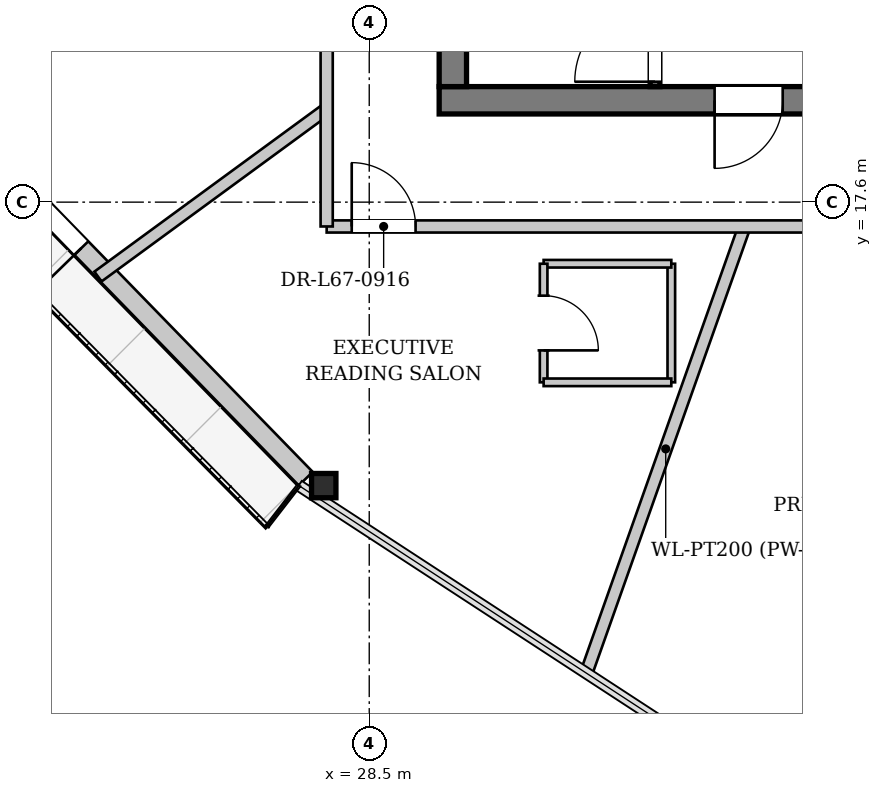
"""IFC4 building model, lengths in metres.
Left out: names, types, materials, properties, quantities, classifications, styles, units other than length and angle.
Written with IfcOpenShell. Run it as: python <this file> out.ifc"""

import sys

from ifc_helpers import new_model, si_unit, direction, frame, frame_2d, origin, origin_2d, place, context, subcontext, project, spatial, rectangle, i_section, extrude, source, transform, mapped, element, fill, save


model = new_model("IFC4")
c1 = context("Model", 3, precision=1e-05, world=origin(), true_north=direction((0.0, 1.0)))
c2 = subcontext(c1, "Body", "Model", "MODEL_VIEW")
j1 = project(units=[si_unit("LENGTHUNIT", "METRE"), si_unit("PLANEANGLEUNIT", "RADIAN")], contexts=[c1])
p1 = place(None, origin())
s1 = spatial("IfcSite", under=j1, at=p1, CompositionType="ELEMENT")
p2 = place(p1, origin())
s2 = spatial("IfcBuilding", under=s1, at=p2, CompositionType="ELEMENT")
p3 = place(p2, frame((0.0, 0.0, 252.5)))
s3 = spatial("IfcBuildingStorey", under=s2, at=p3, CompositionType="ELEMENT", Elevation=252.5)
m1 = source(origin(), c2, "Body", "SweptSolid", [
    extrude(i_section(OverallWidth=0.401, OverallDepth=0.399, WebThickness=0.022, FlangeThickness=0.034, at=origin_2d()), origin(), (0.0, 0.0, 1.0), 3.532),
])
p4 = place(p3, frame((27.341, 12.94, 0.0), z_axis=(0.232405350285, -0.001036906679, 0.972618464756), x_axis=(0.004461585576, 0.999990047078, 0.0)))
e1 = element("IfcColumn", 1, at=p4, inside=s3, PredefinedType="COLUMN", context=c2, shape_type="MappedRepresentation", body=[
    mapped(m1, transform((0.0, 0.0, 0.0), x_axis=(1.0, 0.0, 0.0), y_axis=(0.0, 1.0, 0.0), z_axis=(0.0, 0.0, 1.0), scale=1.0)),
])
p5 = place(p3, frame((27.456, 13.052, 0.0), z_axis=(0.0, 0.0, 1.0), x_axis=(-0.697464355139, 0.71661947595, 0.0)))
e2 = element("IfcWall", 2, at=p5, inside=s3, PredefinedType="SOLIDWALL", context=c2, shape_type="SweptSolid", body=[
    extrude(rectangle(XDim=17.474, YDim=0.32, at=frame_2d((8.737, 0.0))), origin(), (0.0, 0.0, 1.0), 2.872),
])
p6 = place(p5, frame((5.292, 0.0, 0.0)))
e3 = element("IfcOpeningElement", 3, at=p6, cuts=e2, PredefinedType="OPENING", context=c2, shape_type="SweptSolid", body=[
    extrude(rectangle(XDim=1.5, YDim=2.3, at=frame_2d((0.75, 1.15))), frame((0.0, 0.17, 0.0), z_axis=(0.0, -1.0, 0.0), x_axis=(1.0, 0.0, 0.0)), (0.0, 0.0, 1.0), 0.34),
])
p7 = place(p5, frame((11.631, 0.0, 0.402)))
e4 = element("IfcOpeningElement", 4, at=p7, cuts=e2, PredefinedType="OPENING", context=c2, shape_type="SweptSolid", body=[
    extrude(rectangle(XDim=2.6, YDim=2.35, at=frame_2d((1.3, 1.175))), frame((0.0, 0.17, 0.0), z_axis=(0.0, -1.0, 0.0), x_axis=(1.0, 0.0, 0.0)), (0.0, 0.0, 1.0), 0.34),
])
p8 = place(p3, frame((46.35, 19.275, 0.0), z_axis=(0.0, 0.0, 1.0), x_axis=(-1.0, 0.0, 0.0)))
e5 = element("IfcWall", 5, at=p8, inside=s3, PredefinedType="SHEAR", context=c2, shape_type="SweptSolid", body=[
    extrude(rectangle(XDim=16.7, YDim=0.45, at=frame_2d((8.35, 0.0))), origin(), (0.0, 0.0, 1.0), 3.38),
])
p9 = place(p8, frame((4.55, 0.0, 0.0)))
e6 = element("IfcOpeningElement", 6, at=p9, cuts=e5, PredefinedType="OPENING", context=c2, shape_type="SweptSolid", body=[
    extrude(rectangle(XDim=1.12, YDim=2.25, at=frame_2d((0.56, 1.125))), frame((0.0, 0.235, 0.0), z_axis=(0.0, -1.0, 0.0), x_axis=(1.0, 0.0, 0.0)), (0.0, 0.0, 1.0), 0.47),
])
p10 = place(p8, frame((11.05, 0.0, 0.0)))
e7 = element("IfcOpeningElement", 7, at=p10, cuts=e5, PredefinedType="OPENING", context=c2, shape_type="SweptSolid", body=[
    extrude(rectangle(XDim=1.12, YDim=2.25, at=frame_2d((0.56, 1.125))), frame((0.0, 0.235, 0.0), z_axis=(0.0, -1.0, 0.0), x_axis=(1.0, 0.0, 0.0)), (0.0, 0.0, 1.0), 0.47),
])
p11 = place(p3, frame((29.875, 19.5, 0.0), z_axis=(0.0, 0.0, 1.0), x_axis=(0.0, 1.0, 0.0)))
e8 = element("IfcWall", 8, at=p11, inside=s3, PredefinedType="SHEAR", context=c2, shape_type="SweptSolid", body=[
    extrude(rectangle(XDim=14.2, YDim=0.45, at=frame_2d((7.1, 0.0))), origin(), (0.0, 0.0, 1.0), 3.38),
])
p12 = place(p11, frame((7.42, 0.0, 0.0)))
e9 = element("IfcOpeningElement", 9, at=p12, cuts=e8, PredefinedType="OPENING", context=c2, shape_type="SweptSolid", body=[
    extrude(rectangle(XDim=1.6, YDim=2.2, at=frame_2d((0.8, 1.1))), frame((0.0, 0.235, 0.0), z_axis=(0.0, -1.0, 0.0), x_axis=(1.0, 0.0, 0.0)), (0.0, 0.0, 1.0), 0.47),
])
p13 = place(p3, frame((33.2, 19.5, 0.0), z_axis=(0.0, 0.0, 1.0), x_axis=(0.0, 1.0, 0.0)))
e10 = element("IfcWall", 10, at=p13, inside=s3, PredefinedType="PARTITIONING", context=c2, shape_type="SweptSolid", body=[
    extrude(rectangle(XDim=7.46, YDim=0.16, at=frame_2d((3.73, 0.0))), origin(), (0.0, 0.0, 1.0), 3.38),
])
p14 = place(p13, frame((0.08, 0.0, 0.0)))
e11 = element("IfcOpeningElement", 11, at=p14, cuts=e10, PredefinedType="OPENING", context=c2, shape_type="SweptSolid", body=[
    extrude(rectangle(XDim=1.32, YDim=2.2, at=frame_2d((0.66, 1.1))), frame((0.0, 0.09, 0.0), z_axis=(0.0, -1.0, 0.0), x_axis=(1.0, 0.0, 0.0)), (0.0, 0.0, 1.0), 0.18),
])
p15 = place(p3, frame((34.671, 17.2, 0.0), z_axis=(0.0, 0.0, 1.0), x_axis=(-0.333820355847, -0.942636711582, 0.0)))
e12 = element("IfcWall", 12, at=p15, inside=s3, PredefinedType="PARTITIONING", context=c2, shape_type="SweptSolid", body=[
    extrude(rectangle(XDim=7.761, YDim=0.2, at=frame_2d((3.881, 0.0))), origin(), (0.0, 0.0, 1.0), 3.38),
])
p16 = place(p3, frame((27.8, 19.131, 0.0), z_axis=(0.0, 0.0, 1.0), x_axis=(-0.80679773716, -0.590827734042, 0.0)))
e13 = element("IfcWall", 13, at=p16, inside=s3, PredefinedType="PARTITIONING", context=c2, shape_type="SweptSolid", body=[
    extrude(rectangle(XDim=4.662, YDim=0.2, at=frame_2d((2.331, 0.0))), origin(), (0.0, 0.0, 1.0), 3.38),
])
p17 = place(p3, frame((33.468, 14.637, 0.0), z_axis=(0.0, 0.0, 1.0), x_axis=(0.0, 1.0, 0.0)))
e14 = element("IfcWall", 14, at=p17, inside=s3, PredefinedType="PARTITIONING", context=c2, shape_type="SweptSolid", body=[
    extrude(rectangle(XDim=1.95, YDim=0.125, at=frame_2d((0.975, 0.0))), origin(), (0.0, 0.0, 1.0), 3.38),
])
p18 = place(p3, frame((33.468, 16.587, 0.0), z_axis=(0.0, 0.0, 1.0), x_axis=(-1.0, 0.0, 0.0)))
e15 = element("IfcWall", 15, at=p18, inside=s3, PredefinedType="PARTITIONING", context=c2, shape_type="SweptSolid", body=[
    extrude(rectangle(XDim=2.1, YDim=0.125, at=frame_2d((1.05, 0.0))), origin(), (0.0, 0.0, 1.0), 3.38),
])
p19 = place(p3, frame((31.368, 16.587, 0.0), z_axis=(0.0, 0.0, 1.0), x_axis=(0.0, -1.0, 0.0)))
e16 = element("IfcWall", 16, at=p19, inside=s3, PredefinedType="PARTITIONING", context=c2, shape_type="SweptSolid", body=[
    extrude(rectangle(XDim=1.95, YDim=0.125, at=frame_2d((0.975, 0.0))), origin(), (0.0, 0.0, 1.0), 3.38),
])
p20 = place(p19, frame((0.525, 0.0, 0.0)))
e17 = element("IfcOpeningElement", 17, at=p20, cuts=e16, PredefinedType="OPENING", context=c2, shape_type="SweptSolid", body=[
    extrude(rectangle(XDim=0.9, YDim=2.1, at=frame_2d((0.45, 1.05))), frame((0.0, 0.073, 0.0), z_axis=(0.0, -1.0, 0.0), x_axis=(1.0, 0.0, 0.0)), (0.0, 0.0, 1.0), 0.145),
])
p21 = place(p3, frame((31.368, 14.637, 0.0), z_axis=(0.0, 0.0, 1.0), x_axis=(1.0, 0.0, 0.0)))
e18 = element("IfcWall", 18, at=p21, inside=s3, PredefinedType="PARTITIONING", context=c2, shape_type="SweptSolid", body=[
    extrude(rectangle(XDim=2.1, YDim=0.125, at=frame_2d((1.05, 0.0))), origin(), (0.0, 0.0, 1.0), 3.38),
])
p22 = place(p3, frame((27.8, 17.2, 0.0), z_axis=(0.0, 0.0, 1.0), x_axis=(1.0, 0.0, 0.0)))
e19 = element("IfcWall", 19, at=p22, inside=s3, PredefinedType="PARTITIONING", context=c2, shape_type="SweptSolid", body=[
    extrude(rectangle(XDim=20.4, YDim=0.2, at=frame_2d((10.2, 0.0))), origin(), (0.0, 0.0, 1.0), 3.38),
])
p23 = place(p22, frame((9.356, 0.0, 0.0)))
e20 = element("IfcOpeningElement", 20, at=p23, cuts=e19, PredefinedType="OPENING", context=c2, shape_type="SweptSolid", body=[
    extrude(rectangle(XDim=1.05, YDim=2.2, at=frame_2d((0.525, 1.1))), frame((0.0, 0.11, 0.0), z_axis=(0.0, -1.0, 0.0), x_axis=(1.0, 0.0, 0.0)), (0.0, 0.0, 1.0), 0.22),
])
p24 = place(p22, frame((17.51, 0.0, 0.0)))
e21 = element("IfcOpeningElement", 21, at=p24, cuts=e19, PredefinedType="OPENING", context=c2, shape_type="SweptSolid", body=[
    extrude(rectangle(XDim=1.05, YDim=2.2, at=frame_2d((0.525, 1.1))), frame((0.0, 0.11, 0.0), z_axis=(0.0, -1.0, 0.0), x_axis=(1.0, 0.0, 0.0)), (0.0, 0.0, 1.0), 0.22),
])
p25 = place(p22, frame((0.412, 0.0, 0.0)))
e22 = element("IfcOpeningElement", 22, at=p25, cuts=e19, PredefinedType="OPENING", context=c2, shape_type="SweptSolid", body=[
    extrude(rectangle(XDim=1.05, YDim=2.2, at=frame_2d((0.525, 1.1))), frame((0.0, 0.11, 0.0), z_axis=(0.0, -1.0, 0.0), x_axis=(1.0, 0.0, 0.0)), (0.0, 0.0, 1.0), 0.22),
])
p26 = place(p3, frame((27.8, 17.2, 0.0), z_axis=(0.0, 0.0, 1.0), x_axis=(0.0, 1.0, 0.0)))
e23 = element("IfcWall", 23, at=p26, inside=s3, PredefinedType="PARTITIONING", context=c2, shape_type="SweptSolid", body=[
    extrude(rectangle(XDim=18.8, YDim=0.2, at=frame_2d((9.4, 0.0))), origin(), (0.0, 0.0, 1.0), 3.38),
])
p27 = place(p26, frame((14.526, 0.0, 0.0)))
e24 = element("IfcOpeningElement", 24, at=p27, cuts=e23, PredefinedType="OPENING", context=c2, shape_type="SweptSolid", body=[
    extrude(rectangle(XDim=1.05, YDim=2.2, at=frame_2d((0.525, 1.1))), frame((0.0, 0.11, 0.0), z_axis=(0.0, -1.0, 0.0), x_axis=(1.0, 0.0, 0.0)), (0.0, 0.0, 1.0), 0.22),
])
p28 = place(p26, frame((4.597, 0.0, 0.0)))
e25 = element("IfcOpeningElement", 25, at=p28, cuts=e23, PredefinedType="OPENING", context=c2, shape_type="SweptSolid", body=[
    extrude(rectangle(XDim=1.05, YDim=2.2, at=frame_2d((0.525, 1.1))), frame((0.0, 0.11, 0.0), z_axis=(0.0, -1.0, 0.0), x_axis=(1.0, 0.0, 0.0)), (0.0, 0.0, 1.0), 0.22),
])
m2 = source(origin(), c2, "Body", "SweptSolid", [
    extrude(rectangle(XDim=1.5, YDim=2.3, at=frame_2d((0.75, 1.15))), frame((0.0, 0.025, 0.0), z_axis=(0.0, -1.0, 0.0), x_axis=(1.0, 0.0, 0.0)), (0.0, 0.0, 1.0), 0.05),
])
p29 = place(p6, origin())
e26 = element("IfcDoor", 26, at=p29, inside=s3, OperationType="DOUBLE_DOOR_SINGLE_SWING", PredefinedType="DOOR", context=c2, shape_type="MappedRepresentation", body=[
    mapped(m2, transform((0.0, 0.0, 0.0), x_axis=(1.0, 0.0, 0.0), y_axis=(0.0, 1.0, 0.0), z_axis=(0.0, 0.0, 1.0), scale=1.0)),
])
fill(e3, e26)
m3 = source(origin(), c2, "Body", "SweptSolid", [
    extrude(rectangle(XDim=1.12, YDim=2.25, at=frame_2d((0.56, 1.125))), frame((0.0, 0.025, 0.0), z_axis=(0.0, -1.0, 0.0), x_axis=(1.0, 0.0, 0.0)), (0.0, 0.0, 1.0), 0.05),
])
p30 = place(p10, origin())
e27 = element("IfcDoor", 27, at=p30, inside=s3, OperationType="SINGLE_SWING_RIGHT", PredefinedType="DOOR", context=c2, shape_type="MappedRepresentation", body=[
    mapped(m3, transform((0.0, 0.0, 0.0), x_axis=(1.0, 0.0, 0.0), y_axis=(0.0, 1.0, 0.0), z_axis=(0.0, 0.0, 1.0), scale=1.0)),
])
fill(e7, e27)
m4 = source(origin(), c2, "Body", "SweptSolid", [
    extrude(rectangle(XDim=1.32, YDim=2.2, at=frame_2d((0.66, 1.1))), frame((0.0, 0.025, 0.0), z_axis=(0.0, -1.0, 0.0), x_axis=(1.0, 0.0, 0.0)), (0.0, 0.0, 1.0), 0.05),
])
p31 = place(p14, origin())
e28 = element("IfcDoor", 28, at=p31, inside=s3, OperationType="SINGLE_SWING_LEFT", PredefinedType="DOOR", context=c2, shape_type="MappedRepresentation", body=[
    mapped(m4, transform((0.0, 0.0, 0.0), x_axis=(1.0, 0.0, 0.0), y_axis=(0.0, 1.0, 0.0), z_axis=(0.0, 0.0, 1.0), scale=1.0)),
])
fill(e11, e28)
m5 = source(origin(), c2, "Body", "SweptSolid", [
    extrude(rectangle(XDim=0.9, YDim=2.1, at=frame_2d((0.45, 1.05))), frame((0.0, 0.025, 0.0), z_axis=(0.0, -1.0, 0.0), x_axis=(1.0, 0.0, 0.0)), (0.0, 0.0, 1.0), 0.05),
])
p32 = place(p20, origin())
e29 = element("IfcDoor", 29, at=p32, inside=s3, OperationType="SINGLE_SWING_RIGHT", PredefinedType="DOOR", context=c2, shape_type="MappedRepresentation", body=[
    mapped(m5, transform((0.0, 0.0, 0.0), x_axis=(1.0, 0.0, 0.0), y_axis=(0.0, 1.0, 0.0), z_axis=(0.0, 0.0, 1.0), scale=1.0)),
])
fill(e17, e29)
m6 = source(origin(), c2, "Body", "SweptSolid", [
    extrude(rectangle(XDim=1.05, YDim=2.2, at=frame_2d((0.525, 1.1))), frame((0.0, 0.025, 0.0), z_axis=(0.0, -1.0, 0.0), x_axis=(1.0, 0.0, 0.0)), (0.0, 0.0, 1.0), 0.05),
])
p33 = place(p25, origin())
e30 = element("IfcDoor", 30, at=p33, inside=s3, OperationType="SINGLE_SWING_LEFT", PredefinedType="DOOR", context=c2, shape_type="MappedRepresentation", body=[
    mapped(m6, transform((0.0, 0.0, 0.0), x_axis=(1.0, 0.0, 0.0), y_axis=(0.0, 1.0, 0.0), z_axis=(0.0, 0.0, 1.0), scale=1.0)),
])
fill(e22, e30)
save(model, sys.argv[1])
